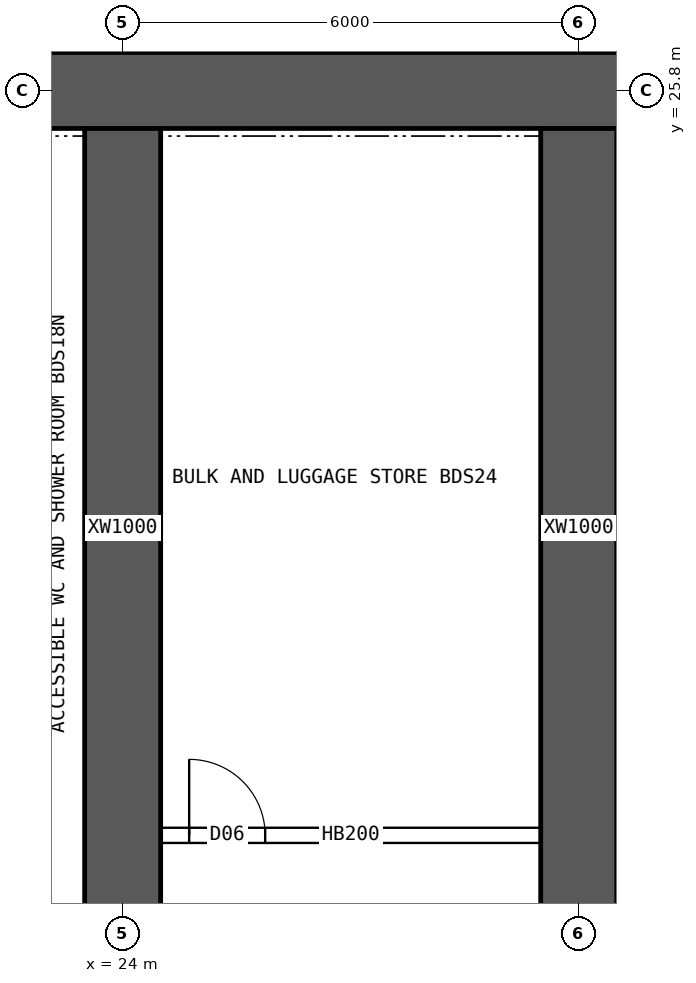
"""IFC4 building model, lengths in metres.
Left out: names, types, materials, properties, quantities, classifications, styles, units other than length and angle.
Written with IfcOpenShell. Run it as: python <this file> out.ifc"""

import sys

from ifc_helpers import new_model, si_unit, direction, frame, frame_2d, origin, place, context, subcontext, project, spatial, rectangle, extrude, element, fill, save


model = new_model("IFC4")
c1 = context("Model", 3, precision=1e-05, world=origin(), true_north=direction((0.0, 1.0)))
c2 = subcontext(c1, "Body", "Model", "MODEL_VIEW")
j1 = project(units=[si_unit("LENGTHUNIT", "METRE"), si_unit("PLANEANGLEUNIT", "RADIAN")], contexts=[c1])
p1 = place(None, origin())
s1 = spatial("IfcSite", under=j1, at=p1, CompositionType="ELEMENT")
p2 = place(p1, origin())
s2 = spatial("IfcBuilding", under=s1, at=p2, CompositionType="ELEMENT")
p3 = place(p2, frame((0.0, 0.0, 20.2)))
s3 = spatial("IfcBuildingStorey", under=s2, at=p3, CompositionType="ELEMENT", Elevation=20.2)
p4 = place(p3, frame((18.0, 25.8, 0.0), z_axis=(0.0, 0.0, 1.0), x_axis=(1.0, 0.0, 0.0)))
e1 = element("IfcWall", 1, at=p4, inside=s3, PredefinedType="SHEAR", context=c2, shape_type="SweptSolid", body=[
    extrude(rectangle(XDim=48.0, YDim=1.0, at=frame_2d((24.0, 0.0))), origin(), (0.0, 0.0, 1.0), 3.75),
])
for number, where, z_axis, x_axis in (
    (2, (24.0, 14.8, 0.0), (0.0, 0.0, 1.0), (0.0, 1.0, 0.0)),
    (3, (30.0, 14.8, 0.0), (0.0, 0.0, 1.0), (0.0, 1.0, 0.0)),
):
    element("IfcWall", number, at=place(p3, frame(where, z_axis=z_axis, x_axis=x_axis)), inside=s3, PredefinedType="SHEAR", context=c2, shape_type="SweptSolid", body=[
        extrude(rectangle(XDim=10.5, YDim=1.0, at=frame_2d((5.25, 0.0))), origin(), (0.0, 0.0, 1.0), 3.75),
    ])
p5 = place(p3, frame((24.5, 16.0, 0.0), z_axis=(0.0, 0.0, 1.0), x_axis=(1.0, 0.0, 0.0)))
e4 = element("IfcWall", 4, at=p5, inside=s3, PredefinedType="SOLIDWALL", context=c2, shape_type="SweptSolid", body=[
    extrude(rectangle(XDim=5.0, YDim=0.2, at=frame_2d((2.5, 0.0))), origin(), (0.0, 0.0, 1.0), 3.3),
])
p6 = place(p5, frame((0.375, 0.0, 0.0)))
e5 = element("IfcOpeningElement", 5, at=p6, cuts=e4, PredefinedType="OPENING", context=c2, shape_type="SweptSolid", body=[
    extrude(rectangle(XDim=1.0, YDim=2.1, at=frame_2d((0.5, 1.05))), frame((0.0, 0.11, 0.0), z_axis=(0.0, -1.0, 0.0), x_axis=(1.0, 0.0, 0.0)), (0.0, 0.0, 1.0), 0.22),
])
p7 = place(p6, origin())
e6 = element("IfcDoor", 6, at=p7, inside=s3, OperationType="SINGLE_SWING_LEFT", PredefinedType="DOOR", context=c2, shape_type="SweptSolid", body=[
    extrude(rectangle(XDim=1.0, YDim=2.1, at=frame_2d((0.5, 1.05))), frame((0.0, 0.025, 0.0), z_axis=(0.0, -1.0, 0.0), x_axis=(1.0, 0.0, 0.0)), (0.0, 0.0, 1.0), 0.05),
])
fill(e5, e6)
save(model, sys.argv[1])
